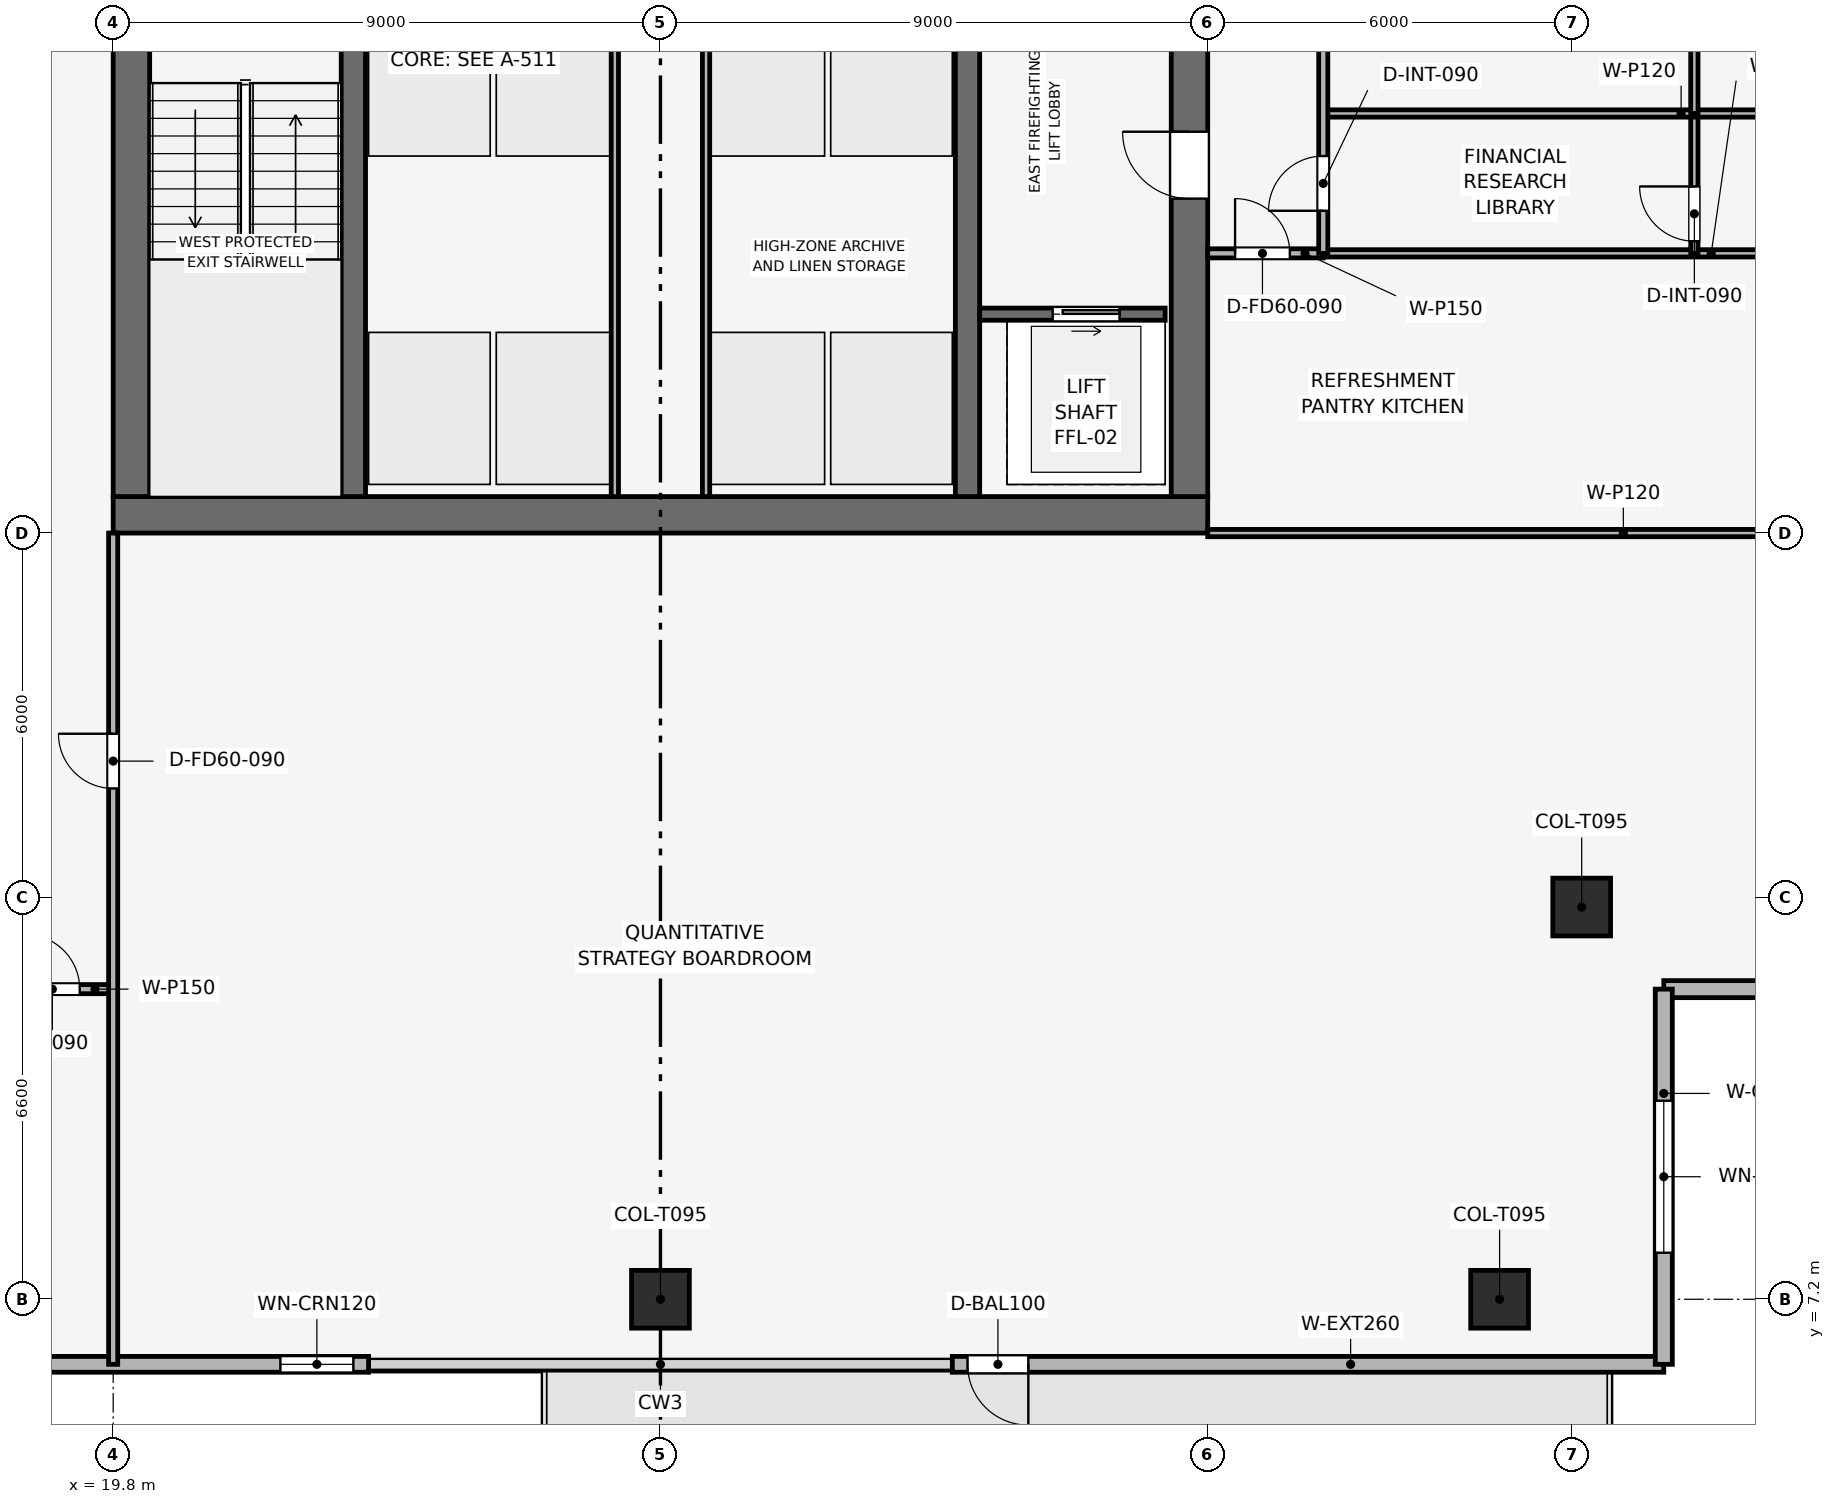
"""IFC4 building model, lengths in metres.
Left out: names, types, materials, properties, quantities, classifications, styles, units other than length and angle.
Written with IfcOpenShell. Run it as: python <this file> out.ifc"""

import sys

from ifc_helpers import new_model, si_unit, direction, frame, frame_2d, origin, origin_2d, place, context, subcontext, project, spatial, rectangle, extrude, element, fill, save


model = new_model("IFC4")
c1 = context("Model", 3, precision=1e-05, world=origin(), true_north=direction((0.0, 1.0)))
c2 = subcontext(c1, "Body", "Model", "MODEL_VIEW")
j1 = project(units=[si_unit("LENGTHUNIT", "METRE"), si_unit("PLANEANGLEUNIT", "RADIAN")], contexts=[c1])
p1 = place(None, origin())
s1 = spatial("IfcSite", under=j1, at=p1, CompositionType="ELEMENT")
p2 = place(p1, origin())
s2 = spatial("IfcBuilding", under=s1, at=p2, CompositionType="ELEMENT")
p3 = place(p2, frame((0.0, 0.0, 318.0)))
s3 = spatial("IfcBuildingStorey", under=s2, at=p3, CompositionType="ELEMENT", Elevation=318.0)
p4 = place(p3, frame((19.8, 20.1, 0.0), z_axis=(0.0, 0.0, 1.0), x_axis=(1.0, 0.0, 0.0)))
e1 = element("IfcWall", 1, at=p4, inside=s3, PredefinedType="SHEAR", context=c2, shape_type="SweptSolid", body=[
    extrude(rectangle(XDim=18.0, YDim=0.6, at=frame_2d((9.0, 0.0))), origin(), (0.0, 0.0, 1.0), 3.75),
])
p5 = place(p3, frame((20.1, 20.4, 0.0), z_axis=(0.0, 0.0, 1.0), x_axis=(0.0, 1.0, 0.0)))
e2 = element("IfcWall", 2, at=p5, inside=s3, PredefinedType="SHEAR", context=c2, shape_type="SweptSolid", body=[
    extrude(rectangle(XDim=16.8, YDim=0.6, at=frame_2d((8.4, 0.0))), origin(), (0.0, 0.0, 1.0), 3.75),
])
p6 = place(p5, frame((10.4, 0.0, 0.0)))
e3 = element("IfcOpeningElement", 3, at=p6, cuts=e2, PredefinedType="OPENING", context=c2, shape_type="SweptSolid", body=[
    extrude(rectangle(XDim=1.1, YDim=2.15, at=frame_2d((0.55, 1.075))), frame((0.0, 0.31, 0.0), z_axis=(0.0, -1.0, 0.0), x_axis=(1.0, 0.0, 0.0)), (0.0, 0.0, 1.0), 0.62),
])
p7 = place(p3, frame((37.5, 20.4, 0.0), z_axis=(0.0, 0.0, 1.0), x_axis=(0.0, 1.0, 0.0)))
e4 = element("IfcWall", 4, at=p7, inside=s3, PredefinedType="SHEAR", context=c2, shape_type="SweptSolid", body=[
    extrude(rectangle(XDim=16.8, YDim=0.6, at=frame_2d((8.4, 0.0))), origin(), (0.0, 0.0, 1.0), 3.75),
])
p8 = place(p7, frame((4.9, 0.0, 0.0)))
e5 = element("IfcOpeningElement", 5, at=p8, cuts=e4, PredefinedType="OPENING", context=c2, shape_type="SweptSolid", body=[
    extrude(rectangle(XDim=1.1, YDim=2.15, at=frame_2d((0.55, 1.075))), frame((0.0, 0.31, 0.0), z_axis=(0.0, -1.0, 0.0), x_axis=(1.0, 0.0, 0.0)), (0.0, 0.0, 1.0), 0.62),
])
for number, where, z_axis, x_axis in (
    (6, (23.75, 20.4, 0.0), (0.0, 0.0, 1.0), (0.0, 1.0, 0.0)),
    (7, (33.85, 20.4, 0.0), (0.0, 0.0, 1.0), (0.0, 1.0, 0.0)),
):
    element("IfcWall", number, at=place(p3, frame(where, z_axis=z_axis, x_axis=x_axis)), inside=s3, PredefinedType="SHEAR", context=c2, shape_type="SweptSolid", body=[
        extrude(rectangle(XDim=16.8, YDim=0.4, at=frame_2d((8.4, 0.0))), origin(), (0.0, 0.0, 1.0), 3.75),
    ])
for number, where, z_axis, x_axis in (
    (8, (28.8, 7.2, 0.003), (0.0, 0.0, 1.0), (1.0, 0.0, 0.0)),
    (9, (42.6, 7.2, 0.003), (0.0, 0.0, 1.0), (1.0, 0.0, 0.0)),
    (10, (43.95, 13.65, 0.003), (0.0, 0.0, 1.0), (1.0, 0.0, 0.0)),
):
    element("IfcColumn", number, at=place(p3, frame(where, z_axis=z_axis, x_axis=x_axis)), inside=s3, PredefinedType="COLUMN", context=c2, shape_type="SweptSolid", body=[
        extrude(rectangle(XDim=0.95, YDim=0.95, at=origin_2d()), origin(), (0.0, 0.0, 1.0), 3.504),
    ])
p9 = place(p3, frame((45.3, 6.13, 0.0), z_axis=(0.0, 0.0, 1.0), x_axis=(-1.0, 0.0, 0.0)))
e11 = element("IfcWall", 11, at=p9, inside=s3, PredefinedType="SOLIDWALL", context=c2, shape_type="SweptSolid", body=[
    extrude(rectangle(XDim=11.7, YDim=0.26, at=frame_2d((5.85, 0.0))), origin(), (0.0, 0.0, 1.0), 3.51),
])
p10 = place(p9, frame((10.45, 0.0, 0.0)))
e12 = element("IfcOpeningElement", 12, at=p10, cuts=e11, PredefinedType="OPENING", context=c2, shape_type="SweptSolid", body=[
    extrude(rectangle(XDim=1.0, YDim=2.2, at=frame_2d((0.5, 1.1))), frame((0.0, 0.14, 0.0), z_axis=(0.0, -1.0, 0.0), x_axis=(1.0, 0.0, 0.0)), (0.0, 0.0, 1.0), 0.28),
])
p11 = place(p3, frame((24.0, 6.13, 0.0), z_axis=(0.0, 0.0, 1.0), x_axis=(-1.0, 0.0, 0.0)))
e13 = element("IfcWall", 13, at=p11, inside=s3, PredefinedType="SOLIDWALL", context=c2, shape_type="SweptSolid", body=[
    extrude(rectangle(XDim=11.7, YDim=0.26, at=frame_2d((5.85, 0.0))), origin(), (0.0, 0.0, 1.0), 3.51),
])
p12 = place(p11, frame((0.25, 0.0, 0.9)))
e14 = element("IfcOpeningElement", 14, at=p12, cuts=e13, PredefinedType="OPENING", context=c2, shape_type="SweptSolid", body=[
    extrude(rectangle(XDim=1.2, YDim=2.1, at=frame_2d((0.6, 1.05))), frame((0.0, 0.14, 0.0), z_axis=(0.0, -1.0, 0.0), x_axis=(1.0, 0.0, 0.0)), (0.0, 0.0, 1.0), 0.28),
])
p13 = place(p3, frame((51.47, 12.3, 0.0), z_axis=(0.0, 0.0, 1.0), x_axis=(-1.0, 0.0, 0.0)))
e15 = element("IfcWall", 15, at=p13, inside=s3, PredefinedType="SOLIDWALL", context=c2, shape_type="SweptSolid", body=[
    extrude(rectangle(XDim=6.17, YDim=0.28, at=frame_2d((3.085, 0.0))), origin(), (0.0, 0.0, 1.0), 3.51),
])
p14 = place(p13, frame((1.835, 0.0, 0.9)))
e16 = element("IfcOpeningElement", 16, at=p14, cuts=e15, PredefinedType="OPENING", context=c2, shape_type="SweptSolid", body=[
    extrude(rectangle(XDim=2.5, YDim=1.9, at=frame_2d((1.25, 0.95))), frame((0.0, 0.15, 0.0), z_axis=(0.0, -1.0, 0.0), x_axis=(1.0, 0.0, 0.0)), (0.0, 0.0, 1.0), 0.3),
])
p15 = place(p3, frame((45.3, 12.3, 0.0), z_axis=(0.0, 0.0, 1.0), x_axis=(0.0, -1.0, 0.0)))
e17 = element("IfcWall", 17, at=p15, inside=s3, PredefinedType="SOLIDWALL", context=c2, shape_type="SweptSolid", body=[
    extrude(rectangle(XDim=6.17, YDim=0.28, at=frame_2d((3.085, 0.0))), origin(), (0.0, 0.0, 1.0), 3.51),
])
p16 = place(p15, frame((1.835, 0.0, 0.9)))
e18 = element("IfcOpeningElement", 18, at=p16, cuts=e17, PredefinedType="OPENING", context=c2, shape_type="SweptSolid", body=[
    extrude(rectangle(XDim=2.5, YDim=1.9, at=frame_2d((1.25, 0.95))), frame((0.0, 0.15, 0.0), z_axis=(0.0, -1.0, 0.0), x_axis=(1.0, 0.0, 0.0)), (0.0, 0.0, 1.0), 0.3),
])
p17 = place(p3, frame((34.05, 23.4, 0.0), z_axis=(0.0, 0.0, 1.0), x_axis=(1.0, 0.0, 0.0)))
e19 = element("IfcWall", 19, at=p17, inside=s3, PredefinedType="SHEAR", context=c2, shape_type="SweptSolid", body=[
    extrude(rectangle(XDim=3.05, YDim=0.2, at=frame_2d((1.525, 0.0))), origin(), (0.0, 0.0, 1.0), 3.51),
])
p18 = place(p17, frame((1.2, 0.0, 0.0)))
e20 = element("IfcOpeningElement", 20, at=p18, cuts=e19, PredefinedType="OPENING", context=c2, shape_type="SweptSolid", body=[
    extrude(rectangle(XDim=1.1, YDim=2.15, at=frame_2d((0.55, 1.075))), frame((0.0, 0.11, 0.0), z_axis=(0.0, -1.0, 0.0), x_axis=(1.0, 0.0, 0.0)), (0.0, 0.0, 1.0), 0.22),
])
for number, where, z_axis, x_axis in (
    (21, (28.05, 20.4, 0.0), (0.0, 0.0, 1.0), (0.0, 1.0, 0.0)),
    (22, (29.55, 20.4, 0.0), (0.0, 0.0, 1.0), (0.0, 1.0, 0.0)),
):
    element("IfcWall", number, at=place(p3, frame(where, z_axis=z_axis, x_axis=x_axis)), inside=s3, PredefinedType="PARTITIONING", context=c2, shape_type="SweptSolid", body=[
        extrude(rectangle(XDim=8.15, YDim=0.12, at=frame_2d((4.075, 0.0))), origin(), (0.0, 0.0, 1.0), 3.51),
    ])
p19 = place(p3, frame((17.9, 12.3, 0.0), z_axis=(0.0, 0.0, 1.0), x_axis=(1.0, 0.0, 0.0)))
e23 = element("IfcWall", 23, at=p19, inside=s3, PredefinedType="PARTITIONING", context=c2, shape_type="SweptSolid", body=[
    extrude(rectangle(XDim=1.9, YDim=0.15, at=frame_2d((0.95, 0.0))), origin(), (0.0, 0.0, 1.0), 3.51),
])
p20 = place(p19, frame((0.45, 0.0, 0.0)))
e24 = element("IfcOpeningElement", 24, at=p20, cuts=e23, PredefinedType="OPENING", context=c2, shape_type="SweptSolid", body=[
    extrude(rectangle(XDim=0.9, YDim=2.1, at=frame_2d((0.45, 1.05))), frame((0.0, 0.085, 0.0), z_axis=(0.0, -1.0, 0.0), x_axis=(1.0, 0.0, 0.0)), (0.0, 0.0, 1.0), 0.17),
])
p21 = place(p3, frame((19.8, 6.13, 0.0), z_axis=(0.0, 0.0, 1.0), x_axis=(0.0, 1.0, 0.0)))
e25 = element("IfcWall", 25, at=p21, inside=s3, PredefinedType="PARTITIONING", context=c2, shape_type="SweptSolid", body=[
    extrude(rectangle(XDim=13.67, YDim=0.15, at=frame_2d((6.835, 0.0))), origin(), (0.0, 0.0, 1.0), 3.095),
])
p22 = place(p21, frame((9.47, 0.0, 0.0)))
e26 = element("IfcOpeningElement", 26, at=p22, cuts=e25, PredefinedType="OPENING", context=c2, shape_type="SweptSolid", body=[
    extrude(rectangle(XDim=0.9, YDim=2.1, at=frame_2d((0.45, 1.05))), frame((0.0, 0.085, 0.0), z_axis=(0.0, -1.0, 0.0), x_axis=(1.0, 0.0, 0.0)), (0.0, 0.0, 1.0), 0.17),
])
p23 = place(p3, frame((37.8, 19.8, 0.0), z_axis=(0.0, 0.0, 1.0), x_axis=(1.0, 0.0, 0.0)))
e27 = element("IfcWall", 27, at=p23, inside=s3, PredefinedType="PARTITIONING", context=c2, shape_type="SweptSolid", body=[
    extrude(rectangle(XDim=13.67, YDim=0.12, at=frame_2d((6.835, 0.0))), origin(), (0.0, 0.0, 1.0), 3.095),
])
p24 = place(p3, frame((37.8, 24.4, 0.0), z_axis=(0.0, 0.0, 1.0), x_axis=(1.0, 0.0, 0.0)))
e28 = element("IfcWall", 28, at=p24, inside=s3, PredefinedType="PARTITIONING", context=c2, shape_type="SweptSolid", body=[
    extrude(rectangle(XDim=1.9, YDim=0.15, at=frame_2d((0.95, 0.0))), origin(), (0.0, 0.0, 1.0), 3.51),
])
p25 = place(p24, frame((0.45, 0.0, 0.0)))
e29 = element("IfcOpeningElement", 29, at=p25, cuts=e28, PredefinedType="OPENING", context=c2, shape_type="SweptSolid", body=[
    extrude(rectangle(XDim=0.9, YDim=2.1, at=frame_2d((0.45, 1.05))), frame((0.0, 0.085, 0.0), z_axis=(0.0, -1.0, 0.0), x_axis=(1.0, 0.0, 0.0)), (0.0, 0.0, 1.0), 0.17),
])
p26 = place(p3, frame((39.7, 24.4, 0.0), z_axis=(0.0, 0.0, 1.0), x_axis=(1.0, 0.0, 0.0)))
e30 = element("IfcWall", 30, at=p26, inside=s3, PredefinedType="PARTITIONING", context=c2, shape_type="SweptSolid", body=[
    extrude(rectangle(XDim=11.77, YDim=0.12, at=frame_2d((5.885, 0.0))), origin(), (0.0, 0.0, 1.0), 3.135),
])
p27 = place(p3, frame((45.803, 24.4, 0.0), z_axis=(0.0, 0.0, 1.0), x_axis=(0.0, 1.0, 0.0)))
e31 = element("IfcWall", 31, at=p27, inside=s3, PredefinedType="PARTITIONING", context=c2, shape_type="SweptSolid", body=[
    extrude(rectangle(XDim=2.3, YDim=0.12, at=frame_2d((1.15, 0.0))), origin(), (0.0, 0.0, 1.0), 3.51),
])
p28 = place(p27, frame((0.2, 0.0, 0.0)))
e32 = element("IfcOpeningElement", 32, at=p28, cuts=e31, PredefinedType="OPENING", context=c2, shape_type="SweptSolid", body=[
    extrude(rectangle(XDim=0.9, YDim=2.1, at=frame_2d((0.45, 1.05))), frame((0.0, 0.07, 0.0), z_axis=(0.0, -1.0, 0.0), x_axis=(1.0, 0.0, 0.0)), (0.0, 0.0, 1.0), 0.14),
])
p29 = place(p3, frame((39.7, 26.7, 0.0), z_axis=(0.0, 0.0, 1.0), x_axis=(1.0, 0.0, 0.0)))
e33 = element("IfcWall", 33, at=p29, inside=s3, PredefinedType="PARTITIONING", context=c2, shape_type="SweptSolid", body=[
    extrude(rectangle(XDim=11.77, YDim=0.12, at=frame_2d((5.885, 0.0))), origin(), (0.0, 0.0, 1.0), 3.135),
])
p30 = place(p3, frame((45.803, 26.7, 0.0), z_axis=(0.0, 0.0, 1.0), x_axis=(0.0, 1.0, 0.0)))
e34 = element("IfcWall", 34, at=p30, inside=s3, PredefinedType="PARTITIONING", context=c2, shape_type="SweptSolid", body=[
    extrude(rectangle(XDim=4.595, YDim=0.12, at=frame_2d((2.297, 0.0))), origin(), (0.0, 0.0, 1.0), 3.095),
])
p31 = place(p30, frame((3.495, 0.0, 0.0)))
e35 = element("IfcOpeningElement", 35, at=p31, cuts=e34, PredefinedType="OPENING", context=c2, shape_type="SweptSolid", body=[
    extrude(rectangle(XDim=0.9, YDim=2.1, at=frame_2d((0.45, 1.05))), frame((0.0, 0.07, 0.0), z_axis=(0.0, -1.0, 0.0), x_axis=(1.0, 0.0, 0.0)), (0.0, 0.0, 1.0), 0.14),
])
p32 = place(p3, frame((39.7, 24.4, 0.0), z_axis=(0.0, 0.0, 1.0), x_axis=(0.0, 1.0, 0.0)))
e36 = element("IfcWall", 36, at=p32, inside=s3, PredefinedType="PARTITIONING", context=c2, shape_type="SweptSolid", body=[
    extrude(rectangle(XDim=15.3, YDim=0.15, at=frame_2d((7.65, 0.0))), origin(), (0.0, 0.0, 1.0), 3.095),
])
p33 = place(p32, frame((0.7, 0.0, 0.0)))
e37 = element("IfcOpeningElement", 37, at=p33, cuts=e36, PredefinedType="OPENING", context=c2, shape_type="SweptSolid", body=[
    extrude(rectangle(XDim=0.9, YDim=2.1, at=frame_2d((0.45, 1.05))), frame((0.0, 0.085, 0.0), z_axis=(0.0, -1.0, 0.0), x_axis=(1.0, 0.0, 0.0)), (0.0, 0.0, 1.0), 0.17),
])
p34 = place(p32, frame((4.148, 0.0, 0.0)))
e38 = element("IfcOpeningElement", 38, at=p34, cuts=e36, PredefinedType="OPENING", context=c2, shape_type="SweptSolid", body=[
    extrude(rectangle(XDim=0.9, YDim=2.1, at=frame_2d((0.45, 1.05))), frame((0.0, 0.085, 0.0), z_axis=(0.0, -1.0, 0.0), x_axis=(1.0, 0.0, 0.0)), (0.0, 0.0, 1.0), 0.17),
])
p35 = place(p32, frame((10.648, 0.0, 0.0)))
e39 = element("IfcOpeningElement", 39, at=p35, cuts=e36, PredefinedType="OPENING", context=c2, shape_type="SweptSolid", body=[
    extrude(rectangle(XDim=0.9, YDim=2.1, at=frame_2d((0.45, 1.05))), frame((0.0, 0.085, 0.0), z_axis=(0.0, -1.0, 0.0), x_axis=(1.0, 0.0, 0.0)), (0.0, 0.0, 1.0), 0.17),
])
p36 = place(p10, origin())
e40 = element("IfcDoor", 40, at=p36, inside=s3, OperationType="SINGLE_SWING_LEFT", PredefinedType="DOOR", context=c2, shape_type="SweptSolid", body=[
    extrude(rectangle(XDim=1.0, YDim=2.2, at=frame_2d((0.5, 1.1))), frame((0.0, 0.025, 0.0), z_axis=(0.0, -1.0, 0.0), x_axis=(1.0, 0.0, 0.0)), (0.0, 0.0, 1.0), 0.05),
])
fill(e12, e40)
p37 = place(p12, origin())
e41 = element("IfcWindow", 41, at=p37, inside=s3, PartitioningType="SINGLE_PANEL", PredefinedType="WINDOW", context=c2, shape_type="SweptSolid", body=[
    extrude(rectangle(XDim=1.2, YDim=2.1, at=frame_2d((0.6, 1.05))), frame((0.0, 0.03, 0.0), z_axis=(0.0, -1.0, 0.0), x_axis=(1.0, 0.0, 0.0)), (0.0, 0.0, 1.0), 0.06),
])
fill(e14, e41)
p38 = place(p16, origin())
e42 = element("IfcWindow", 42, at=p38, inside=s3, PartitioningType="SINGLE_PANEL", PredefinedType="WINDOW", context=c2, shape_type="SweptSolid", body=[
    extrude(rectangle(XDim=2.5, YDim=1.9, at=frame_2d((1.25, 0.95))), frame((0.0, 0.03, 0.0), z_axis=(0.0, -1.0, 0.0), x_axis=(1.0, 0.0, 0.0)), (0.0, 0.0, 1.0), 0.06),
])
fill(e18, e42)
p39 = place(p18, origin())
e43 = element("IfcDoor", 43, at=p39, inside=s3, OperationType="SLIDING_TO_RIGHT", PredefinedType="DOOR", context=c2, shape_type="SweptSolid", body=[
    extrude(rectangle(XDim=1.1, YDim=2.15, at=frame_2d((0.55, 1.075))), frame((0.0, 0.025, 0.0), z_axis=(0.0, -1.0, 0.0), x_axis=(1.0, 0.0, 0.0)), (0.0, 0.0, 1.0), 0.05),
])
fill(e20, e43)
p40 = place(p20, origin())
e44 = element("IfcDoor", 44, at=p40, inside=s3, OperationType="SINGLE_SWING_LEFT", PredefinedType="DOOR", context=c2, shape_type="SweptSolid", body=[
    extrude(rectangle(XDim=0.9, YDim=2.1, at=frame_2d((0.45, 1.05))), frame((0.0, 0.025, 0.0), z_axis=(0.0, -1.0, 0.0), x_axis=(1.0, 0.0, 0.0)), (0.0, 0.0, 1.0), 0.05),
])
fill(e24, e44)
p41 = place(p22, origin())
e45 = element("IfcDoor", 45, at=p41, inside=s3, OperationType="SINGLE_SWING_RIGHT", PredefinedType="DOOR", context=c2, shape_type="SweptSolid", body=[
    extrude(rectangle(XDim=0.9, YDim=2.1, at=frame_2d((0.45, 1.05))), frame((0.0, 0.025, 0.0), z_axis=(0.0, -1.0, 0.0), x_axis=(1.0, 0.0, 0.0)), (0.0, 0.0, 1.0), 0.05),
])
fill(e26, e45)
p42 = place(p25, origin())
e46 = element("IfcDoor", 46, at=p42, inside=s3, OperationType="SINGLE_SWING_LEFT", PredefinedType="DOOR", context=c2, shape_type="SweptSolid", body=[
    extrude(rectangle(XDim=0.9, YDim=2.1, at=frame_2d((0.45, 1.05))), frame((0.0, 0.025, 0.0), z_axis=(0.0, -1.0, 0.0), x_axis=(1.0, 0.0, 0.0)), (0.0, 0.0, 1.0), 0.05),
])
fill(e29, e46)
p43 = place(p28, origin())
e47 = element("IfcDoor", 47, at=p43, inside=s3, OperationType="SINGLE_SWING_RIGHT", PredefinedType="DOOR", context=c2, shape_type="SweptSolid", body=[
    extrude(rectangle(XDim=0.9, YDim=2.1, at=frame_2d((0.45, 1.05))), frame((0.0, 0.025, 0.0), z_axis=(0.0, -1.0, 0.0), x_axis=(1.0, 0.0, 0.0)), (0.0, 0.0, 1.0), 0.05),
])
fill(e32, e47)
p44 = place(p33, origin())
e48 = element("IfcDoor", 48, at=p44, inside=s3, OperationType="SINGLE_SWING_LEFT", PredefinedType="DOOR", context=c2, shape_type="SweptSolid", body=[
    extrude(rectangle(XDim=0.9, YDim=2.1, at=frame_2d((0.45, 1.05))), frame((0.0, 0.025, 0.0), z_axis=(0.0, -1.0, 0.0), x_axis=(1.0, 0.0, 0.0)), (0.0, 0.0, 1.0), 0.05),
])
fill(e37, e48)
p45 = place(p8, origin())
e49 = element("IfcDoor", 49, at=p45, inside=s3, OperationType="SINGLE_SWING_RIGHT", PredefinedType="DOOR", context=c2, shape_type="SweptSolid", body=[
    extrude(rectangle(XDim=1.1, YDim=2.15, at=frame_2d((0.55, 1.075))), frame((0.0, 0.025, 0.0), z_axis=(0.0, -1.0, 0.0), x_axis=(1.0, 0.0, 0.0)), (0.0, 0.0, 1.0), 0.05),
])
fill(e5, e49)
save(model, sys.argv[1])
